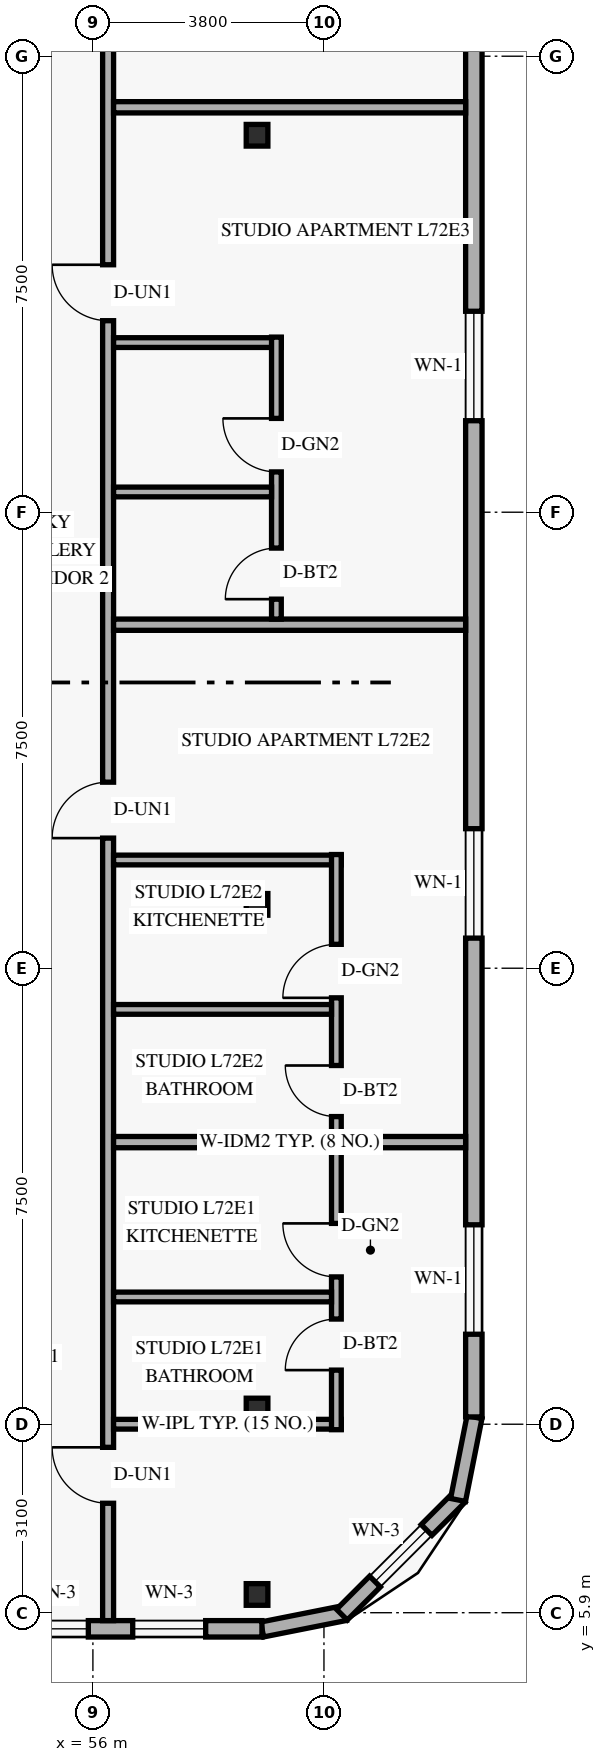
"""IFC4 building model, lengths in metres.
Left out: names, types, materials, properties, quantities, classifications, styles, units other than length and angle.
Written with IfcOpenShell. Run it as: python <this file> out.ifc"""

import sys

from ifc_helpers import new_model, si_unit, direction, frame, frame_2d, origin, origin_2d, place, context, subcontext, project, spatial, rectangle, hollow_rectangle, extrude, element, fill, save


model = new_model("IFC4")
c1 = context("Model", 3, precision=1e-05, world=origin(), true_north=direction((0.0, 1.0)))
c2 = subcontext(c1, "Body", "Model", "MODEL_VIEW")
j1 = project(units=[si_unit("LENGTHUNIT", "METRE"), si_unit("PLANEANGLEUNIT", "RADIAN")], contexts=[c1])
p1 = place(None, origin())
s1 = spatial("IfcSite", under=j1, at=p1, CompositionType="ELEMENT")
p2 = place(p1, origin())
s2 = spatial("IfcBuilding", under=s1, at=p2, CompositionType="ELEMENT")
p3 = place(p2, frame((0.0, 0.0, 274.8)))
s3 = spatial("IfcBuildingStorey", under=s2, at=p3, CompositionType="ELEMENT", Elevation=274.8)
for number, where, z_axis, x_axis in (
    (1, (58.595, 6.2, 0.0), (0.058, 0.0, 0.998), (0.0, 1.0, 0.0)),
    (2, (58.595, 9.25, 0.0), (0.058, 0.0, 0.998), (0.0, 1.0, 0.0)),
    (3, (58.595, 17.55, 0.0), (0.058, 0.0, 0.998), (0.0, 1.0, 0.0)),
    (4, (58.595, 30.2, 0.0), (0.058, 0.0, 0.998), (0.0, 1.0, 0.0)),
):
    element("IfcColumn", number, at=place(p3, frame(where, z_axis=z_axis, x_axis=x_axis)), inside=s3, PredefinedType="COLUMN", context=c2, shape_type="SweptSolid", body=[
        extrude(hollow_rectangle(XDim=0.356, YDim=0.356, WallThickness=0.016, at=origin_2d()), origin(), (0.0, 0.0, 1.0), 3.606),
    ])
p4 = place(p3, frame((58.783, 5.624, 0.0), z_axis=(0.0, 0.0, 1.0), x_axis=(0.980809899341, 0.19496651342, 0.0)))
e5 = element("IfcWall", 5, at=p4, inside=s3, PredefinedType="SOLIDWALL", context=c2, shape_type="SweptSolid", body=[
    extrude(rectangle(XDim=1.389, YDim=0.25, at=frame_2d((0.694, 0.0))), origin(), (0.0, 0.0, 1.0), 3.36),
])
p5 = place(p3, frame((60.095, 5.868, 0.0), z_axis=(0.0, 0.0, 1.0), x_axis=(0.707106781187, 0.707106781187, 0.0)))
e6 = element("IfcWall", 6, at=p5, inside=s3, PredefinedType="SOLIDWALL", context=c2, shape_type="SweptSolid", body=[
    extrude(rectangle(XDim=2.739, YDim=0.25, at=frame_2d((1.37, 0.0))), origin(), (0.0, 0.0, 1.0), 3.36),
])
p6 = place(p5, frame((0.77, 0.0, 0.85)))
e7 = element("IfcOpeningElement", 7, at=p6, cuts=e6, PredefinedType="OPENING", context=c2, shape_type="SweptSolid", body=[
    extrude(rectangle(XDim=1.2, YDim=1.5, at=frame_2d((0.6, 0.75))), frame((0.0, 0.135, 0.0), z_axis=(0.0, -1.0, 0.0), x_axis=(1.0, 0.0, 0.0)), (0.0, 0.0, 1.0), 0.27),
])
p7 = place(p3, frame((62.005, 7.754, 0.0), z_axis=(0.0, 0.0, 1.0), x_axis=(0.195135625965, 0.9807762678, 0.0)))
e8 = element("IfcWall", 8, at=p7, inside=s3, PredefinedType="SOLIDWALL", context=c2, shape_type="SweptSolid", body=[
    extrude(rectangle(XDim=1.389, YDim=0.25, at=frame_2d((0.694, 0.0))), origin(), (0.0, 0.0, 1.0), 3.36),
])
p8 = place(p3, frame((25.82, 5.635, 0.0), z_axis=(0.0, 0.0, 1.0), x_axis=(1.0, 0.0, 0.0)))
e9 = element("IfcWall", 9, at=p8, inside=s3, PredefinedType="SOLIDWALL", context=c2, shape_type="SweptSolid", body=[
    extrude(rectangle(XDim=32.96, YDim=0.27, at=frame_2d((16.48, 0.0))), origin(), (0.0, 0.0, 1.0), 3.36),
])
p9 = place(p8, frame((14.262, 0.0, 0.85)))
e10 = element("IfcOpeningElement", 10, at=p9, cuts=e9, PredefinedType="OPENING", context=c2, shape_type="SweptSolid", body=[
    extrude(rectangle(XDim=1.65, YDim=1.6, at=frame_2d((0.825, 0.8))), frame((0.0, 0.145, 0.0), z_axis=(0.0, -1.0, 0.0), x_axis=(1.0, 0.0, 0.0)), (0.0, 0.0, 1.0), 0.29),
])
p10 = place(p8, frame((25.583, 0.0, 0.85)))
e11 = element("IfcOpeningElement", 11, at=p10, cuts=e9, PredefinedType="OPENING", context=c2, shape_type="SweptSolid", body=[
    extrude(rectangle(XDim=1.65, YDim=1.6, at=frame_2d((0.825, 0.8))), frame((0.0, 0.145, 0.0), z_axis=(0.0, -1.0, 0.0), x_axis=(1.0, 0.0, 0.0)), (0.0, 0.0, 1.0), 0.29),
])
p11 = place(p8, frame((28.905, 0.0, 0.85)))
e12 = element("IfcOpeningElement", 12, at=p11, cuts=e9, PredefinedType="OPENING", context=c2, shape_type="SweptSolid", body=[
    extrude(rectangle(XDim=1.2, YDim=1.5, at=frame_2d((0.6, 0.75))), frame((0.0, 0.145, 0.0), z_axis=(0.0, -1.0, 0.0), x_axis=(1.0, 0.0, 0.0)), (0.0, 0.0, 1.0), 0.29),
])
p12 = place(p8, frame((30.835, 0.0, 0.85)))
e13 = element("IfcOpeningElement", 13, at=p12, cuts=e9, PredefinedType="OPENING", context=c2, shape_type="SweptSolid", body=[
    extrude(rectangle(XDim=1.2, YDim=1.5, at=frame_2d((0.6, 0.75))), frame((0.0, 0.145, 0.0), z_axis=(0.0, -1.0, 0.0), x_axis=(1.0, 0.0, 0.0)), (0.0, 0.0, 1.0), 0.29),
])
p13 = place(p3, frame((62.265, 9.12, 0.0), z_axis=(0.0, 0.0, 1.0), x_axis=(0.0, 1.0, 0.0)))
e14 = element("IfcWall", 14, at=p13, inside=s3, PredefinedType="SOLIDWALL", context=c2, shape_type="SweptSolid", body=[
    extrude(rectangle(XDim=29.76, YDim=0.27, at=frame_2d((14.88, 0.0))), origin(), (0.0, 0.0, 1.0), 3.36),
])
p14 = place(p13, frame((1.36, 0.0, 0.85)))
e15 = element("IfcOpeningElement", 15, at=p14, cuts=e14, PredefinedType="OPENING", context=c2, shape_type="SweptSolid", body=[
    extrude(rectangle(XDim=1.8, YDim=1.6, at=frame_2d((0.9, 0.8))), frame((0.0, 0.145, 0.0), z_axis=(0.0, -1.0, 0.0), x_axis=(1.0, 0.0, 0.0)), (0.0, 0.0, 1.0), 0.29),
])
p15 = place(p13, frame((7.875, 0.0, 0.85)))
e16 = element("IfcOpeningElement", 16, at=p15, cuts=e14, PredefinedType="OPENING", context=c2, shape_type="SweptSolid", body=[
    extrude(rectangle(XDim=1.8, YDim=1.6, at=frame_2d((0.9, 0.8))), frame((0.0, 0.145, 0.0), z_axis=(0.0, -1.0, 0.0), x_axis=(1.0, 0.0, 0.0)), (0.0, 0.0, 1.0), 0.29),
])
p16 = place(p13, frame((16.385, 0.0, 0.85)))
e17 = element("IfcOpeningElement", 17, at=p16, cuts=e14, PredefinedType="OPENING", context=c2, shape_type="SweptSolid", body=[
    extrude(rectangle(XDim=1.8, YDim=1.6, at=frame_2d((0.9, 0.8))), frame((0.0, 0.145, 0.0), z_axis=(0.0, -1.0, 0.0), x_axis=(1.0, 0.0, 0.0)), (0.0, 0.0, 1.0), 0.29),
])
p17 = place(p13, frame((23.6, 0.0, 0.85)))
e18 = element("IfcOpeningElement", 18, at=p17, cuts=e14, PredefinedType="OPENING", context=c2, shape_type="SweptSolid", body=[
    extrude(rectangle(XDim=1.8, YDim=1.6, at=frame_2d((0.9, 0.8))), frame((0.0, 0.145, 0.0), z_axis=(0.0, -1.0, 0.0), x_axis=(1.0, 0.0, 0.0)), (0.0, 0.0, 1.0), 0.29),
])
p18 = place(p13, frame((27.71, 0.0, 0.85)))
e19 = element("IfcOpeningElement", 19, at=p18, cuts=e14, PredefinedType="OPENING", context=c2, shape_type="SweptSolid", body=[
    extrude(rectangle(XDim=1.8, YDim=1.6, at=frame_2d((0.9, 0.8))), frame((0.0, 0.145, 0.0), z_axis=(0.0, -1.0, 0.0), x_axis=(1.0, 0.0, 0.0)), (0.0, 0.0, 1.0), 0.29),
])
p19 = place(p3, frame((56.25, 5.77, 0.0), z_axis=(0.0, 0.0, 1.0), x_axis=(0.0, 1.0, 0.0)))
e20 = element("IfcWall", 20, at=p19, inside=s3, PredefinedType="STANDARD", context=c2, shape_type="SweptSolid", body=[
    extrude(rectangle(XDim=36.46, YDim=0.18, at=frame_2d((18.23, 0.0))), origin(), (0.0, 0.0, 1.0), 2.803),
])
p20 = place(p19, frame((1.93, 0.0, 0.0)))
e21 = element("IfcOpeningElement", 21, at=p20, cuts=e20, PredefinedType="OPENING", context=c2, shape_type="SweptSolid", body=[
    extrude(rectangle(XDim=0.92, YDim=2.15, at=frame_2d((0.46, 1.075))), frame((0.0, 0.1, 0.0), z_axis=(0.0, -1.0, 0.0), x_axis=(1.0, 0.0, 0.0)), (0.0, 0.0, 1.0), 0.2),
])
p21 = place(p19, frame((12.87, 0.0, 0.0)))
e22 = element("IfcOpeningElement", 22, at=p21, cuts=e20, PredefinedType="OPENING", context=c2, shape_type="SweptSolid", body=[
    extrude(rectangle(XDim=0.92, YDim=2.15, at=frame_2d((0.46, 1.075))), frame((0.0, 0.1, 0.0), z_axis=(0.0, -1.0, 0.0), x_axis=(1.0, 0.0, 0.0)), (0.0, 0.0, 1.0), 0.2),
])
p22 = place(p19, frame((21.38, 0.0, 0.0)))
e23 = element("IfcOpeningElement", 23, at=p22, cuts=e20, PredefinedType="OPENING", context=c2, shape_type="SweptSolid", body=[
    extrude(rectangle(XDim=0.92, YDim=2.15, at=frame_2d((0.46, 1.075))), frame((0.0, 0.1, 0.0), z_axis=(0.0, -1.0, 0.0), x_axis=(1.0, 0.0, 0.0)), (0.0, 0.0, 1.0), 0.2),
])
p23 = place(p19, frame((27.39, 0.0, 0.0)))
e24 = element("IfcOpeningElement", 24, at=p23, cuts=e20, PredefinedType="OPENING", context=c2, shape_type="SweptSolid", body=[
    extrude(rectangle(XDim=0.92, YDim=2.15, at=frame_2d((0.46, 1.075))), frame((0.0, 0.1, 0.0), z_axis=(0.0, -1.0, 0.0), x_axis=(1.0, 0.0, 0.0)), (0.0, 0.0, 1.0), 0.2),
])
p24 = place(p19, frame((33.235, 0.0, 0.0)))
e25 = element("IfcOpeningElement", 25, at=p24, cuts=e20, PredefinedType="OPENING", context=c2, shape_type="SweptSolid", body=[
    extrude(rectangle(XDim=0.92, YDim=2.15, at=frame_2d((0.46, 1.075))), frame((0.0, 0.1, 0.0), z_axis=(0.0, -1.0, 0.0), x_axis=(1.0, 0.0, 0.0)), (0.0, 0.0, 1.0), 0.2),
])
p25 = place(p3, frame((56.34, 9.0, 0.0), z_axis=(0.0, 0.0, 1.0), x_axis=(1.0, 0.0, 0.0)))
e26 = element("IfcWall", 26, at=p25, inside=s3, PredefinedType="PLUMBINGWALL", context=c2, shape_type="SweptSolid", body=[
    extrude(rectangle(XDim=3.744, YDim=0.16, at=frame_2d((1.872, 0.0))), origin(), (0.0, 0.0, 1.0), 2.803),
])
p26 = place(p3, frame((60.004, 8.91, 0.0), z_axis=(0.0, 0.0, 1.0), x_axis=(0.0, 1.0, 0.0)))
e27 = element("IfcWall", 27, at=p26, inside=s3, PredefinedType="PLUMBINGWALL", context=c2, shape_type="SweptSolid", body=[
    extrude(rectangle(XDim=4.73, YDim=0.16, at=frame_2d((2.365, 0.0))), origin(), (0.0, 0.0, 1.0), 3.36),
])
p27 = place(p26, frame((0.98, 0.0, 0.0)))
e28 = element("IfcOpeningElement", 28, at=p27, cuts=e27, PredefinedType="OPENING", context=c2, shape_type="SweptSolid", body=[
    extrude(rectangle(XDim=0.84, YDim=2.12, at=frame_2d((0.42, 1.06))), frame((0.0, 0.09, 0.0), z_axis=(0.0, -1.0, 0.0), x_axis=(1.0, 0.0, 0.0)), (0.0, 0.0, 1.0), 0.18),
])
p28 = place(p26, frame((2.513, 0.0, 0.0)))
e29 = element("IfcOpeningElement", 29, at=p28, cuts=e27, PredefinedType="OPENING", context=c2, shape_type="SweptSolid", body=[
    extrude(rectangle(XDim=0.88, YDim=2.12, at=frame_2d((0.44, 1.06))), frame((0.0, 0.09, 0.0), z_axis=(0.0, -1.0, 0.0), x_axis=(1.0, 0.0, 0.0)), (0.0, 0.0, 1.0), 0.18),
])
p29 = place(p3, frame((56.34, 11.093, 0.0), z_axis=(0.0, 0.0, 1.0), x_axis=(1.0, 0.0, 0.0)))
e30 = element("IfcWall", 30, at=p29, inside=s3, PredefinedType="PLUMBINGWALL", context=c2, shape_type="SweptSolid", body=[
    extrude(rectangle(XDim=3.584, YDim=0.16, at=frame_2d((1.792, 0.0))), origin(), (0.0, 0.0, 1.0), 2.803),
])
p30 = place(p3, frame((56.34, 13.64, 0.0), z_axis=(0.0, 0.0, 1.0), x_axis=(1.0, 0.0, 0.0)))
e31 = element("IfcWall", 31, at=p30, inside=s3, PredefinedType="PARTITIONING", context=c2, shape_type="SweptSolid", body=[
    extrude(rectangle(XDim=5.79, YDim=0.185, at=frame_2d((2.895, 0.0))), origin(), (0.0, 0.0, 1.0), 2.803),
])
p31 = place(p3, frame((56.34, 18.28, 0.0), z_axis=(0.0, 0.0, 1.0), x_axis=(1.0, 0.0, 0.0)))
e32 = element("IfcWall", 32, at=p31, inside=s3, PredefinedType="PLUMBINGWALL", context=c2, shape_type="SweptSolid", body=[
    extrude(rectangle(XDim=3.744, YDim=0.16, at=frame_2d((1.872, 0.0))), origin(), (0.0, 0.0, 1.0), 2.803),
])
p32 = place(p3, frame((60.004, 13.732, 0.0), z_axis=(0.0, 0.0, 1.0), x_axis=(0.0, 1.0, 0.0)))
e33 = element("IfcWall", 33, at=p32, inside=s3, PredefinedType="PLUMBINGWALL", context=c2, shape_type="SweptSolid", body=[
    extrude(rectangle(XDim=4.638, YDim=0.16, at=frame_2d((2.319, 0.0))), origin(), (0.0, 0.0, 1.0), 3.36),
])
p33 = place(p32, frame((0.327, 0.0, 0.0)))
e34 = element("IfcOpeningElement", 34, at=p33, cuts=e33, PredefinedType="OPENING", context=c2, shape_type="SweptSolid", body=[
    extrude(rectangle(XDim=0.84, YDim=2.12, at=frame_2d((0.42, 1.06))), frame((0.0, 0.09, 0.0), z_axis=(0.0, -1.0, 0.0), x_axis=(1.0, 0.0, 0.0)), (0.0, 0.0, 1.0), 0.18),
])
p34 = place(p32, frame((2.281, 0.0, 0.0)))
e35 = element("IfcOpeningElement", 35, at=p34, cuts=e33, PredefinedType="OPENING", context=c2, shape_type="SweptSolid", body=[
    extrude(rectangle(XDim=0.88, YDim=2.12, at=frame_2d((0.44, 1.06))), frame((0.0, 0.09, 0.0), z_axis=(0.0, -1.0, 0.0), x_axis=(1.0, 0.0, 0.0)), (0.0, 0.0, 1.0), 0.18),
])
p35 = place(p3, frame((56.34, 15.823, 0.0), z_axis=(0.0, 0.0, 1.0), x_axis=(1.0, 0.0, 0.0)))
e36 = element("IfcWall", 36, at=p35, inside=s3, PredefinedType="PLUMBINGWALL", context=c2, shape_type="SweptSolid", body=[
    extrude(rectangle(XDim=3.584, YDim=0.16, at=frame_2d((1.792, 0.0))), origin(), (0.0, 0.0, 1.0), 2.803),
])
p36 = place(p3, frame((56.34, 22.15, 0.0), z_axis=(0.0, 0.0, 1.0), x_axis=(1.0, 0.0, 0.0)))
e37 = element("IfcWall", 37, at=p36, inside=s3, PredefinedType="PARTITIONING", context=c2, shape_type="SweptSolid", body=[
    extrude(rectangle(XDim=5.79, YDim=0.185, at=frame_2d((2.895, 0.0))), origin(), (0.0, 0.0, 1.0), 2.803),
])
p37 = place(p3, frame((56.34, 26.79, 0.0), z_axis=(0.0, 0.0, 1.0), x_axis=(1.0, 0.0, 0.0)))
e38 = element("IfcWall", 38, at=p37, inside=s3, PredefinedType="PLUMBINGWALL", context=c2, shape_type="SweptSolid", body=[
    extrude(rectangle(XDim=2.758, YDim=0.16, at=frame_2d((1.379, 0.0))), origin(), (0.0, 0.0, 1.0), 2.803),
])
p38 = place(p3, frame((59.018, 22.242, 0.0), z_axis=(0.0, 0.0, 1.0), x_axis=(0.0, 1.0, 0.0)))
e39 = element("IfcWall", 39, at=p38, inside=s3, PredefinedType="PLUMBINGWALL", context=c2, shape_type="SweptSolid", body=[
    extrude(rectangle(XDim=4.637, YDim=0.16, at=frame_2d((2.319, 0.0))), origin(), (0.0, 0.0, 1.0), 3.36),
])
p39 = place(p38, frame((0.327, 0.0, 0.0)))
e40 = element("IfcOpeningElement", 40, at=p39, cuts=e39, PredefinedType="OPENING", context=c2, shape_type="SweptSolid", body=[
    extrude(rectangle(XDim=0.84, YDim=2.12, at=frame_2d((0.42, 1.06))), frame((0.0, 0.09, 0.0), z_axis=(0.0, -1.0, 0.0), x_axis=(1.0, 0.0, 0.0)), (0.0, 0.0, 1.0), 0.18),
])
p40 = place(p38, frame((2.42, 0.0, 0.0)))
e41 = element("IfcOpeningElement", 41, at=p40, cuts=e39, PredefinedType="OPENING", context=c2, shape_type="SweptSolid", body=[
    extrude(rectangle(XDim=0.88, YDim=2.12, at=frame_2d((0.44, 1.06))), frame((0.0, 0.09, 0.0), z_axis=(0.0, -1.0, 0.0), x_axis=(1.0, 0.0, 0.0)), (0.0, 0.0, 1.0), 0.18),
])
p41 = place(p3, frame((56.34, 24.333, 0.0), z_axis=(0.0, 0.0, 1.0), x_axis=(1.0, 0.0, 0.0)))
e42 = element("IfcWall", 42, at=p41, inside=s3, PredefinedType="PLUMBINGWALL", context=c2, shape_type="SweptSolid", body=[
    extrude(rectangle(XDim=2.598, YDim=0.16, at=frame_2d((1.299, 0.0))), origin(), (0.0, 0.0, 1.0), 2.803),
])
p42 = place(p3, frame((56.34, 30.66, 0.0), z_axis=(0.0, 0.0, 1.0), x_axis=(1.0, 0.0, 0.0)))
e43 = element("IfcWall", 43, at=p42, inside=s3, PredefinedType="PARTITIONING", context=c2, shape_type="SweptSolid", body=[
    extrude(rectangle(XDim=5.79, YDim=0.185, at=frame_2d((2.895, 0.0))), origin(), (0.0, 0.0, 1.0), 2.803),
])
p43 = place(p6, origin())
e44 = element("IfcWindow", 44, at=p43, inside=s3, PartitioningType="SINGLE_PANEL", PredefinedType="WINDOW", context=c2, shape_type="SweptSolid", body=[
    extrude(rectangle(XDim=1.2, YDim=1.5, at=frame_2d((0.6, 0.75))), frame((0.0, 0.03, 0.0), z_axis=(0.0, -1.0, 0.0), x_axis=(1.0, 0.0, 0.0)), (0.0, 0.0, 1.0), 0.06),
])
fill(e7, e44)
p44 = place(p11, origin())
e45 = element("IfcWindow", 45, at=p44, inside=s3, PartitioningType="SINGLE_PANEL", PredefinedType="WINDOW", context=c2, shape_type="SweptSolid", body=[
    extrude(rectangle(XDim=1.2, YDim=1.5, at=frame_2d((0.6, 0.75))), frame((0.0, 0.03, 0.0), z_axis=(0.0, -1.0, 0.0), x_axis=(1.0, 0.0, 0.0)), (0.0, 0.0, 1.0), 0.06),
])
fill(e12, e45)
p45 = place(p12, origin())
e46 = element("IfcWindow", 46, at=p45, inside=s3, PartitioningType="SINGLE_PANEL", PredefinedType="WINDOW", context=c2, shape_type="SweptSolid", body=[
    extrude(rectangle(XDim=1.2, YDim=1.5, at=frame_2d((0.6, 0.75))), frame((0.0, 0.03, 0.0), z_axis=(0.0, -1.0, 0.0), x_axis=(1.0, 0.0, 0.0)), (0.0, 0.0, 1.0), 0.06),
])
fill(e13, e46)
p46 = place(p14, origin())
e47 = element("IfcWindow", 47, at=p46, inside=s3, PartitioningType="SINGLE_PANEL", PredefinedType="WINDOW", context=c2, shape_type="SweptSolid", body=[
    extrude(rectangle(XDim=1.8, YDim=1.6, at=frame_2d((0.9, 0.8))), frame((0.0, 0.03, 0.0), z_axis=(0.0, -1.0, 0.0), x_axis=(1.0, 0.0, 0.0)), (0.0, 0.0, 1.0), 0.06),
])
fill(e15, e47)
p47 = place(p15, origin())
e48 = element("IfcWindow", 48, at=p47, inside=s3, PartitioningType="SINGLE_PANEL", PredefinedType="WINDOW", context=c2, shape_type="SweptSolid", body=[
    extrude(rectangle(XDim=1.8, YDim=1.6, at=frame_2d((0.9, 0.8))), frame((0.0, 0.03, 0.0), z_axis=(0.0, -1.0, 0.0), x_axis=(1.0, 0.0, 0.0)), (0.0, 0.0, 1.0), 0.06),
])
fill(e16, e48)
p48 = place(p16, origin())
e49 = element("IfcWindow", 49, at=p48, inside=s3, PartitioningType="SINGLE_PANEL", PredefinedType="WINDOW", context=c2, shape_type="SweptSolid", body=[
    extrude(rectangle(XDim=1.8, YDim=1.6, at=frame_2d((0.9, 0.8))), frame((0.0, 0.03, 0.0), z_axis=(0.0, -1.0, 0.0), x_axis=(1.0, 0.0, 0.0)), (0.0, 0.0, 1.0), 0.06),
])
fill(e17, e49)
p49 = place(p20, origin())
e50 = element("IfcDoor", 50, at=p49, inside=s3, OperationType="SINGLE_SWING_RIGHT", PredefinedType="DOOR", context=c2, shape_type="SweptSolid", body=[
    extrude(rectangle(XDim=0.92, YDim=2.15, at=frame_2d((0.46, 1.075))), frame((0.0, 0.025, 0.0), z_axis=(0.0, -1.0, 0.0), x_axis=(1.0, 0.0, 0.0)), (0.0, 0.0, 1.0), 0.05),
])
fill(e21, e50)
p50 = place(p27, origin())
e51 = element("IfcDoor", 51, at=p50, inside=s3, OperationType="SINGLE_SWING_LEFT", PredefinedType="DOOR", context=c2, shape_type="SweptSolid", body=[
    extrude(rectangle(XDim=0.84, YDim=2.12, at=frame_2d((0.42, 1.06))), frame((0.0, 0.025, 0.0), z_axis=(0.0, -1.0, 0.0), x_axis=(1.0, 0.0, 0.0)), (0.0, 0.0, 1.0), 0.05),
])
fill(e28, e51)
p51 = place(p28, origin())
e52 = element("IfcDoor", 52, at=p51, inside=s3, OperationType="SINGLE_SWING_RIGHT", PredefinedType="DOOR", context=c2, shape_type="SweptSolid", body=[
    extrude(rectangle(XDim=0.88, YDim=2.12, at=frame_2d((0.44, 1.06))), frame((0.0, 0.025, 0.0), z_axis=(0.0, -1.0, 0.0), x_axis=(1.0, 0.0, 0.0)), (0.0, 0.0, 1.0), 0.05),
])
fill(e29, e52)
p52 = place(p21, origin())
e53 = element("IfcDoor", 53, at=p52, inside=s3, OperationType="SINGLE_SWING_LEFT", PredefinedType="DOOR", context=c2, shape_type="SweptSolid", body=[
    extrude(rectangle(XDim=0.92, YDim=2.15, at=frame_2d((0.46, 1.075))), frame((0.0, 0.025, 0.0), z_axis=(0.0, -1.0, 0.0), x_axis=(1.0, 0.0, 0.0)), (0.0, 0.0, 1.0), 0.05),
])
fill(e22, e53)
p53 = place(p33, origin())
e54 = element("IfcDoor", 54, at=p53, inside=s3, OperationType="SINGLE_SWING_RIGHT", PredefinedType="DOOR", context=c2, shape_type="SweptSolid", body=[
    extrude(rectangle(XDim=0.84, YDim=2.12, at=frame_2d((0.42, 1.06))), frame((0.0, 0.025, 0.0), z_axis=(0.0, -1.0, 0.0), x_axis=(1.0, 0.0, 0.0)), (0.0, 0.0, 1.0), 0.05),
])
fill(e34, e54)
p54 = place(p34, origin())
e55 = element("IfcDoor", 55, at=p54, inside=s3, OperationType="SINGLE_SWING_LEFT", PredefinedType="DOOR", context=c2, shape_type="SweptSolid", body=[
    extrude(rectangle(XDim=0.88, YDim=2.12, at=frame_2d((0.44, 1.06))), frame((0.0, 0.025, 0.0), z_axis=(0.0, -1.0, 0.0), x_axis=(1.0, 0.0, 0.0)), (0.0, 0.0, 1.0), 0.05),
])
fill(e35, e55)
p55 = place(p22, origin())
e56 = element("IfcDoor", 56, at=p55, inside=s3, OperationType="SINGLE_SWING_RIGHT", PredefinedType="DOOR", context=c2, shape_type="SweptSolid", body=[
    extrude(rectangle(XDim=0.92, YDim=2.15, at=frame_2d((0.46, 1.075))), frame((0.0, 0.025, 0.0), z_axis=(0.0, -1.0, 0.0), x_axis=(1.0, 0.0, 0.0)), (0.0, 0.0, 1.0), 0.05),
])
fill(e23, e56)
p56 = place(p39, origin())
e57 = element("IfcDoor", 57, at=p56, inside=s3, OperationType="SINGLE_SWING_LEFT", PredefinedType="DOOR", context=c2, shape_type="SweptSolid", body=[
    extrude(rectangle(XDim=0.84, YDim=2.12, at=frame_2d((0.42, 1.06))), frame((0.0, 0.025, 0.0), z_axis=(0.0, -1.0, 0.0), x_axis=(1.0, 0.0, 0.0)), (0.0, 0.0, 1.0), 0.05),
])
fill(e40, e57)
p57 = place(p40, origin())
e58 = element("IfcDoor", 58, at=p57, inside=s3, OperationType="SINGLE_SWING_RIGHT", PredefinedType="DOOR", context=c2, shape_type="SweptSolid", body=[
    extrude(rectangle(XDim=0.88, YDim=2.12, at=frame_2d((0.44, 1.06))), frame((0.0, 0.025, 0.0), z_axis=(0.0, -1.0, 0.0), x_axis=(1.0, 0.0, 0.0)), (0.0, 0.0, 1.0), 0.05),
])
fill(e41, e58)
save(model, sys.argv[1])
